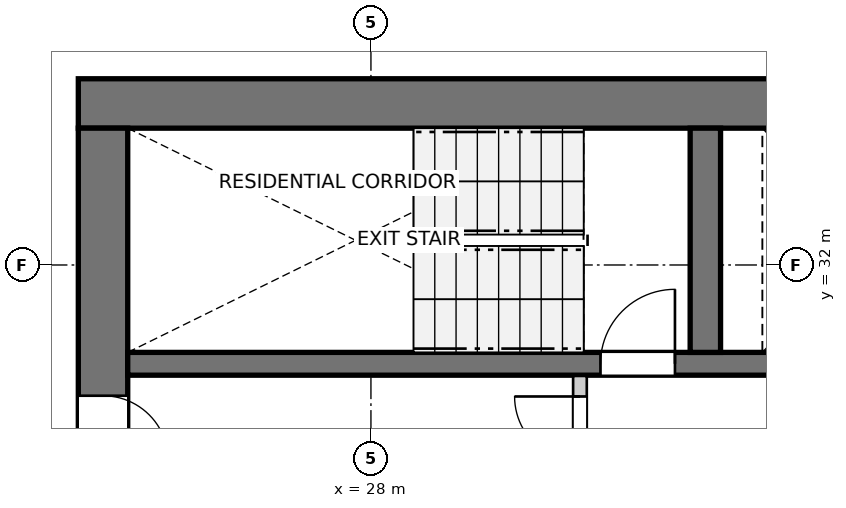
"""IFC4 building model, lengths in metres.
Left out: names, types, materials, properties, quantities, classifications, styles, units other than length and angle.
Written with IfcOpenShell. Run it as: python <this file> out.ifc"""

import sys

from ifc_helpers import new_model, si_unit, direction, frame, frame_2d, origin, place, context, subcontext, project, spatial, rectangle, extrude, source, transform, mapped, element, fill, save


model = new_model("IFC4")
c1 = context("Model", 3, precision=1e-05, world=origin(), true_north=direction((0.0, 1.0)))
c2 = subcontext(c1, "Body", "Model", "MODEL_VIEW")
j1 = project(units=[si_unit("LENGTHUNIT", "METRE"), si_unit("PLANEANGLEUNIT", "RADIAN")], contexts=[c1])
p1 = place(None, origin())
s1 = spatial("IfcSite", under=j1, at=p1, CompositionType="ELEMENT")
p2 = place(p1, origin())
s2 = spatial("IfcBuilding", under=s1, at=p2, CompositionType="ELEMENT")
p3 = place(p2, frame((0.0, 0.0, 99.2)))
s3 = spatial("IfcBuildingStorey", under=s2, at=p3, CompositionType="ELEMENT", Elevation=99.2)
p4 = place(p3, frame((36.55, 34.125, 0.0), z_axis=(0.0, 0.0, 1.0), x_axis=(-1.0, 0.0, 0.0)))
e1 = element("IfcWall", 1, at=p4, inside=s3, PredefinedType="SHEAR", context=c2, shape_type="SweptSolid", body=[
    extrude(rectangle(XDim=12.4, YDim=0.65, at=frame_2d((6.2, 0.0))), origin(), (0.0, 0.0, 1.0), 2.95),
])
p5 = place(p3, frame((24.475, 33.8, 0.0), z_axis=(0.0, 0.0, 1.0), x_axis=(0.0, -1.0, 0.0)))
e2 = element("IfcWall", 2, at=p5, inside=s3, PredefinedType="SHEAR", context=c2, shape_type="SweptSolid", body=[
    extrude(rectangle(XDim=15.6, YDim=0.65, at=frame_2d((7.8, 0.0))), origin(), (0.0, 0.0, 1.0), 2.95),
])
p6 = place(p5, frame((7.05, 0.0, 0.0)))
e3 = element("IfcOpeningElement", 3, at=p6, cuts=e2, PredefinedType="OPENING", context=c2, shape_type="SweptSolid", body=[
    extrude(rectangle(XDim=1.5, YDim=2.15, at=frame_2d((0.75, 1.075))), frame((0.0, 0.335, 0.0), z_axis=(0.0, -1.0, 0.0), x_axis=(1.0, 0.0, 0.0)), (0.0, 0.0, 1.0), 0.67),
])
p7 = place(p5, frame((3.52, 0.0, 0.0)))
e4 = element("IfcOpeningElement", 4, at=p7, cuts=e2, PredefinedType="OPENING", context=c2, shape_type="SweptSolid", body=[
    extrude(rectangle(XDim=0.86, YDim=2.05, at=frame_2d((0.43, 1.025))), frame((0.0, 0.335, 0.0), z_axis=(0.0, -1.0, 0.0), x_axis=(1.0, 0.0, 0.0)), (0.0, 0.0, 1.0), 0.67),
])
p8 = place(p5, frame((11.22, 0.0, 0.0)))
e5 = element("IfcOpeningElement", 5, at=p8, cuts=e2, PredefinedType="OPENING", context=c2, shape_type="SweptSolid", body=[
    extrude(rectangle(XDim=0.86, YDim=2.05, at=frame_2d((0.43, 1.025))), frame((0.0, 0.335, 0.0), z_axis=(0.0, -1.0, 0.0), x_axis=(1.0, 0.0, 0.0)), (0.0, 0.0, 1.0), 0.67),
])
p9 = place(p3, frame((24.8, 30.7, 0.0), z_axis=(0.0, 0.0, 1.0), x_axis=(1.0, 0.0, 0.0)))
e6 = element("IfcWall", 6, at=p9, inside=s3, PredefinedType="SHEAR", context=c2, shape_type="SweptSolid", body=[
    extrude(rectangle(XDim=11.1, YDim=0.3, at=frame_2d((5.55, 0.0))), origin(), (0.0, 0.0, 1.0), 2.95),
])
p10 = place(p9, frame((6.22, 0.0, 0.0)))
e7 = element("IfcOpeningElement", 7, at=p10, cuts=e6, PredefinedType="OPENING", context=c2, shape_type="SweptSolid", body=[
    extrude(rectangle(XDim=0.98, YDim=2.15, at=frame_2d((0.49, 1.075))), frame((0.0, 0.16, 0.0), z_axis=(0.0, -1.0, 0.0), x_axis=(1.0, 0.0, 0.0)), (0.0, 0.0, 1.0), 0.32),
])
p11 = place(p9, frame((9.15, 0.0, 0.0)))
e8 = element("IfcOpeningElement", 8, at=p11, cuts=e6, PredefinedType="OPENING", context=c2, shape_type="SweptSolid", body=[
    extrude(rectangle(XDim=1.15, YDim=2.15, at=frame_2d((0.575, 1.075))), frame((0.0, 0.16, 0.0), z_axis=(0.0, -1.0, 0.0), x_axis=(1.0, 0.0, 0.0)), (0.0, 0.0, 1.0), 0.32),
])
p12 = place(p3, frame((32.4, 30.85, 0.0), z_axis=(0.0, 0.0, 1.0), x_axis=(0.0, 1.0, 0.0)))
e9 = element("IfcWall", 9, at=p12, inside=s3, PredefinedType="SHEAR", context=c2, shape_type="SweptSolid", body=[
    extrude(rectangle(XDim=2.95, YDim=0.4, at=frame_2d((1.475, 0.0))), origin(), (0.0, 0.0, 1.0), 2.95),
])
p13 = place(p3, frame((30.75, 27.43, 0.0), z_axis=(0.0, 0.0, 1.0), x_axis=(0.0, 1.0, 0.0)))
e10 = element("IfcWall", 10, at=p13, inside=s3, PredefinedType="PARTITIONING", context=c2, shape_type="SweptSolid", body=[
    extrude(rectangle(XDim=3.11, YDim=0.18, at=frame_2d((1.555, 0.0))), origin(), (0.0, 0.0, 1.0), 2.95),
])
p14 = place(p13, frame((1.98, 0.0, 0.0)))
e11 = element("IfcOpeningElement", 11, at=p14, cuts=e10, PredefinedType="OPENING", context=c2, shape_type="SweptSolid", body=[
    extrude(rectangle(XDim=0.86, YDim=2.05, at=frame_2d((0.43, 1.025))), frame((0.0, 0.1, 0.0), z_axis=(0.0, -1.0, 0.0), x_axis=(1.0, 0.0, 0.0)), (0.0, 0.0, 1.0), 0.2),
])
m1 = source(origin(), c2, "Body", "SweptSolid", [
    extrude(rectangle(XDim=0.98, YDim=2.15, at=frame_2d((0.49, 1.075))), frame((0.0, 0.025, 0.0), z_axis=(0.0, -1.0, 0.0), x_axis=(1.0, 0.0, 0.0)), (0.0, 0.0, 1.0), 0.05),
])
p15 = place(p10, origin())
e12 = element("IfcDoor", 12, at=p15, inside=s3, OperationType="SINGLE_SWING_RIGHT", PredefinedType="DOOR", context=c2, shape_type="MappedRepresentation", body=[
    mapped(m1, transform((0.0, 0.0, 0.0), x_axis=(1.0, 0.0, 0.0), y_axis=(0.0, 1.0, 0.0), z_axis=(0.0, 0.0, 1.0), scale=1.0)),
])
fill(e7, e12)
m2 = source(origin(), c2, "Body", "SweptSolid", [
    extrude(rectangle(XDim=0.86, YDim=2.05, at=frame_2d((0.43, 1.025))), frame((0.0, 0.025, 0.0), z_axis=(0.0, -1.0, 0.0), x_axis=(1.0, 0.0, 0.0)), (0.0, 0.0, 1.0), 0.05),
])
p16 = place(p7, origin())
e13 = element("IfcDoor", 13, at=p16, inside=s3, OperationType="SINGLE_SWING_RIGHT", PredefinedType="DOOR", context=c2, shape_type="MappedRepresentation", body=[
    mapped(m2, transform((0.0, 0.0, 0.0), x_axis=(1.0, 0.0, 0.0), y_axis=(0.0, 1.0, 0.0), z_axis=(0.0, 0.0, 1.0), scale=1.0)),
])
fill(e4, e13)
p17 = place(p14, origin())
e14 = element("IfcDoor", 14, at=p17, inside=s3, OperationType="SINGLE_SWING_RIGHT", PredefinedType="DOOR", context=c2, shape_type="MappedRepresentation", body=[
    mapped(m2, transform((0.0, 0.0, 0.0), x_axis=(1.0, 0.0, 0.0), y_axis=(0.0, 1.0, 0.0), z_axis=(0.0, 0.0, 1.0), scale=1.0)),
])
fill(e11, e14)
save(model, sys.argv[1])
